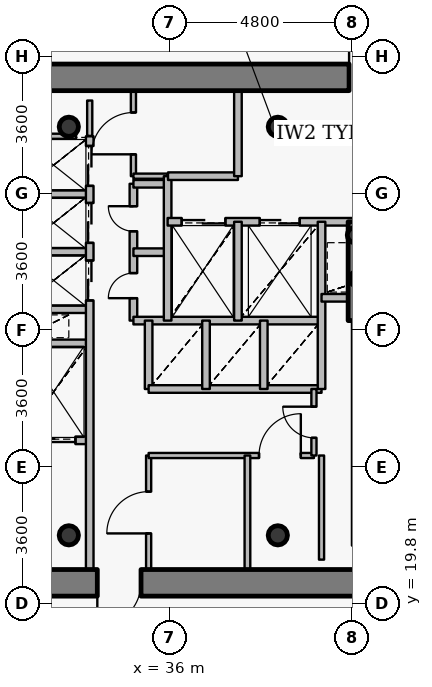
"""IFC4 building model, lengths in metres.
Left out: names, types, materials, properties, quantities, classifications, styles, units other than length and angle.
Written with IfcOpenShell. Run it as: python <this file> out.ifc"""

import sys

from ifc_helpers import new_model, si_unit, direction, frame, frame_2d, origin, origin_2d, place, context, subcontext, project, spatial, rectangle, hollow_circle, extrude, source, transform, mapped, element, fill, save


model = new_model("IFC4")
c1 = context("Model", 3, precision=1e-05, world=origin(), true_north=direction((0.0, 1.0)))
c2 = subcontext(c1, "Body", "Model", "MODEL_VIEW")
j1 = project(units=[si_unit("LENGTHUNIT", "METRE"), si_unit("PLANEANGLEUNIT", "RADIAN")], contexts=[c1])
p1 = place(None, origin())
s1 = spatial("IfcSite", under=j1, at=p1, CompositionType="ELEMENT")
p2 = place(p1, origin())
s2 = spatial("IfcBuilding", under=s1, at=p2, CompositionType="ELEMENT")
p3 = place(p2, frame((0.0, 0.0, 229.05)))
s3 = spatial("IfcBuildingStorey", under=s2, at=p3, CompositionType="ELEMENT", Elevation=229.05)
for number, where, z_axis, x_axis in (
    (1, (33.35, 21.6, 0.0), (0.0, 0.0, 1.0), (1.0, 0.0, 0.0)),
    (2, (38.85, 21.6, 0.0), (0.0, 0.0, 1.0), (1.0, 0.0, 0.0)),
    (3, (38.85, 32.35, 0.0), (0.0, 0.0, 1.0), (1.0, 0.0, 0.0)),
    (4, (33.35, 32.35, 0.0), (0.0, 0.0, 1.0), (1.0, 0.0, 0.0)),
):
    element("IfcColumn", number, at=place(p3, frame(where, z_axis=z_axis, x_axis=x_axis)), inside=s3, PredefinedType="COLUMN", context=c2, shape_type="SweptSolid", body=[
        extrude(hollow_circle(Radius=0.254, WallThickness=0.02, at=origin_2d()), origin(), (0.0, 0.0, 1.0), 3.75),
    ])
for number, where, z_axis, x_axis in (
    (5, (40.95, 28.35, 0.0), (0.0, 0.0, 1.0), (1.0, 0.0, 0.0)),
    (6, (40.88, 29.5, 0.0), (0.0, 0.0, 1.0), (1.0, 0.0, 0.0)),
):
    element("IfcColumn", number, at=place(p3, frame(where, z_axis=z_axis, x_axis=x_axis)), inside=s3, PredefinedType="COLUMN", context=c2, shape_type="SweptSolid", body=[
        extrude(hollow_circle(Radius=0.203, WallThickness=0.016, at=origin_2d()), origin(), (0.0, 0.0, 1.0), 3.75),
    ])
p4 = place(p3, frame((27.05, 33.65, 0.0), z_axis=(0.0, 0.0, 1.0), x_axis=(1.0, 0.0, 0.0)))
e7 = element("IfcWall", 7, at=p4, inside=s3, PredefinedType="SHEAR", context=c2, shape_type="SweptSolid", body=[
    extrude(rectangle(XDim=17.9, YDim=0.7, at=frame_2d((8.95, 0.0))), origin(), (0.0, 0.0, 1.0), 3.05),
])
p5 = place(p4, frame((13.675, 0.0, 0.0)))
e8 = element("IfcOpeningElement", 8, at=p5, cuts=e7, PredefinedType="OPENING", context=c2, shape_type="SweptSolid", body=[
    extrude(rectangle(XDim=1.15, YDim=2.15, at=origin_2d()), frame((0.575, 0.36, 1.075), z_axis=(0.0, -1.0, 0.0), x_axis=(1.0, 0.0, 0.0)), (0.0, 0.0, 1.0), 0.72),
])
p6 = place(p3, frame((44.95, 20.35, 0.0), z_axis=(0.0, 0.0, 1.0), x_axis=(-1.0, 0.0, 0.0)))
e9 = element("IfcWall", 9, at=p6, inside=s3, PredefinedType="SHEAR", context=c2, shape_type="SweptSolid", body=[
    extrude(rectangle(XDim=17.9, YDim=0.7, at=frame_2d((8.95, 0.0))), origin(), (0.0, 0.0, 1.0), 3.05),
])
p7 = place(p6, frame((9.7, 0.0, 0.0)))
e10 = element("IfcOpeningElement", 10, at=p7, cuts=e9, PredefinedType="OPENING", context=c2, shape_type="SweptSolid", body=[
    extrude(rectangle(XDim=1.15, YDim=2.15, at=origin_2d()), frame((0.575, 0.36, 1.075), z_axis=(0.0, -1.0, 0.0), x_axis=(1.0, 0.0, 0.0)), (0.0, 0.0, 1.0), 0.72),
])
p8 = place(p3, frame((40.9, 27.25, 0.0), z_axis=(0.0, 0.0, 1.0), x_axis=(0.0, 1.0, 0.0)))
e11 = element("IfcWall", 11, at=p8, inside=s3, PredefinedType="SHEAR", context=c2, shape_type="SweptSolid", body=[
    extrude(rectangle(XDim=2.6, YDim=0.4, at=frame_2d((1.3, 0.0))), origin(), (0.0, 0.0, 1.0), 3.1),
])
p9 = place(p3, frame((32.0, 24.1, 0.0), z_axis=(0.0, 0.0, 1.0), x_axis=(1.0, 0.0, 0.0)))
e12 = element("IfcWall", 12, at=p9, inside=s3, PredefinedType="PARTITIONING", context=c2, shape_type="SweptSolid", body=[
    extrude(rectangle(XDim=1.9, YDim=0.2, at=frame_2d((0.95, 0.0))), origin(), (0.0, 0.0, 1.0), 3.085),
])
p10 = place(p9, frame((0.375, 0.0, 0.0)))
e13 = element("IfcOpeningElement", 13, at=p10, cuts=e12, PredefinedType="OPENING", context=c2, shape_type="SweptSolid", body=[
    extrude(rectangle(XDim=1.15, YDim=2.15, at=origin_2d()), frame((0.575, 0.11, 1.075), z_axis=(0.0, -1.0, 0.0), x_axis=(1.0, 0.0, 0.0)), (0.0, 0.0, 1.0), 0.22),
])
for number, where, z_axis, x_axis in (
    (14, (32.0, 26.65, 0.0), (0.0, 0.0, 1.0), (1.0, 0.0, 0.0)),
    (15, (32.0, 27.55, 0.0), (0.0, 0.0, 1.0), (1.0, 0.0, 0.0)),
    (16, (32.0, 29.06, 0.0), (0.0, 0.0, 1.0), (1.0, 0.0, 0.0)),
    (17, (32.0, 30.58, 0.0), (0.0, 0.0, 1.0), (1.0, 0.0, 0.0)),
):
    element("IfcWall", number, at=place(p3, frame(where, z_axis=z_axis, x_axis=x_axis)), inside=s3, PredefinedType="PARTITIONING", context=c2, shape_type="SweptSolid", body=[
        extrude(rectangle(XDim=1.9, YDim=0.2, at=frame_2d((0.95, 0.0))), origin(), (0.0, 0.0, 1.0), 3.085),
    ])
p11 = place(p3, frame((33.9, 20.7, 0.0), z_axis=(0.0, 0.0, 1.0), x_axis=(0.0, 1.0, 0.0)))
e18 = element("IfcWall", 18, at=p11, inside=s3, PredefinedType="PARTITIONING", context=c2, shape_type="SweptSolid", body=[
    extrude(rectangle(XDim=11.4, YDim=0.2, at=frame_2d((5.7, 0.0))), origin(), (0.0, 0.0, 1.0), 3.085),
])
p12 = place(p11, frame((7.08, 0.0, 0.0)))
e19 = element("IfcOpeningElement", 19, at=p12, cuts=e18, PredefinedType="OPENING", context=c2, shape_type="SweptSolid", body=[
    extrude(rectangle(XDim=1.05, YDim=2.15, at=origin_2d()), frame((0.525, 0.11, 1.075), z_axis=(0.0, -1.0, 0.0), x_axis=(1.0, 0.0, 0.0)), (0.0, 0.0, 1.0), 0.22),
])
p13 = place(p11, frame((8.595, 0.0, 0.0)))
e20 = element("IfcOpeningElement", 20, at=p13, cuts=e18, PredefinedType="OPENING", context=c2, shape_type="SweptSolid", body=[
    extrude(rectangle(XDim=1.05, YDim=2.15, at=origin_2d()), frame((0.525, 0.11, 1.075), z_axis=(0.0, -1.0, 0.0), x_axis=(1.0, 0.0, 0.0)), (0.0, 0.0, 1.0), 0.22),
])
p14 = place(p11, frame((10.095, 0.0, 0.0)))
e21 = element("IfcOpeningElement", 21, at=p14, cuts=e18, PredefinedType="OPENING", context=c2, shape_type="SweptSolid", body=[
    extrude(rectangle(XDim=1.05, YDim=2.15, at=origin_2d()), frame((0.525, 0.11, 1.075), z_axis=(0.0, -1.0, 0.0), x_axis=(1.0, 0.0, 0.0)), (0.0, 0.0, 1.0), 0.22),
])
p15 = place(p3, frame((35.05, 27.25, 0.0), z_axis=(0.0, 0.0, 1.0), x_axis=(0.0, 1.0, 0.0)))
e22 = element("IfcWall", 22, at=p15, inside=s3, PredefinedType="PARTITIONING", context=c2, shape_type="SweptSolid", body=[
    extrude(rectangle(XDim=3.6, YDim=0.2, at=frame_2d((1.8, 0.0))), origin(), (0.0, 0.0, 1.0), 3.5),
])
p16 = place(p15, frame((0.59, 0.0, 0.0)))
e23 = element("IfcOpeningElement", 23, at=p16, cuts=e22, PredefinedType="OPENING", context=c2, shape_type="SweptSolid", body=[
    extrude(rectangle(XDim=0.66, YDim=2.05, at=origin_2d()), frame((0.33, 0.11, 1.025), z_axis=(0.0, -1.0, 0.0), x_axis=(1.0, 0.0, 0.0)), (0.0, 0.0, 1.0), 0.22),
])
p17 = place(p15, frame((2.35, 0.0, 0.0)))
e24 = element("IfcOpeningElement", 24, at=p17, cuts=e22, PredefinedType="OPENING", context=c2, shape_type="SweptSolid", body=[
    extrude(rectangle(XDim=0.66, YDim=2.05, at=origin_2d()), frame((0.33, 0.11, 1.025), z_axis=(0.0, -1.0, 0.0), x_axis=(1.0, 0.0, 0.0)), (0.0, 0.0, 1.0), 0.22),
])
p18 = place(p3, frame((35.05, 27.25, 0.0), z_axis=(0.0, 0.0, 1.0), x_axis=(1.0, 0.0, 0.0)))
e25 = element("IfcWall", 25, at=p18, inside=s3, PredefinedType="PARTITIONING", context=c2, shape_type="SweptSolid", body=[
    extrude(rectangle(XDim=4.95, YDim=0.2, at=frame_2d((2.475, 0.0))), origin(), (0.0, 0.0, 1.0), 3.085),
])
for number, where, z_axis, x_axis in (
    (26, (35.05, 29.05, 0.0), (0.0, 0.0, 1.0), (1.0, 0.0, 0.0)),
    (27, (35.05, 30.85, 0.0), (0.0, 0.0, 1.0), (1.0, 0.0, 0.0)),
):
    element("IfcWall", number, at=place(p3, frame(where, z_axis=z_axis, x_axis=x_axis)), inside=s3, PredefinedType="PARTITIONING", context=c2, shape_type="SweptSolid", body=[
        extrude(rectangle(XDim=0.9, YDim=0.2, at=frame_2d((0.45, 0.0))), origin(), (0.0, 0.0, 1.0), 3.5),
    ])
p19 = place(p3, frame((35.05, 31.05, 0.0), z_axis=(0.0, 0.0, 1.0), x_axis=(0.0, 1.0, 0.0)))
e28 = element("IfcWall", 28, at=p19, inside=s3, PredefinedType="PARTITIONING", context=c2, shape_type="SweptSolid", body=[
    extrude(rectangle(XDim=2.25, YDim=0.135, at=frame_2d((1.125, 0.0))), origin(), (0.0, 0.0, 1.0), 3.085),
])
p20 = place(p19, frame((0.575, 0.0, 0.0)))
e29 = element("IfcOpeningElement", 29, at=p20, cuts=e28, PredefinedType="OPENING", context=c2, shape_type="SweptSolid", body=[
    extrude(rectangle(XDim=1.1, YDim=2.15, at=origin_2d()), frame((0.55, 0.078, 1.075), z_axis=(0.0, -1.0, 0.0), x_axis=(1.0, 0.0, 0.0)), (0.0, 0.0, 1.0), 0.155),
])
p21 = place(p3, frame((35.05, 31.05, 0.0), z_axis=(0.0, 0.0, 1.0), x_axis=(1.0, 0.0, 0.0)))
e30 = element("IfcWall", 30, at=p21, inside=s3, PredefinedType="PARTITIONING", context=c2, shape_type="SweptSolid", body=[
    extrude(rectangle(XDim=0.9, YDim=0.135, at=frame_2d((0.45, 0.0))), origin(), (0.0, 0.0, 1.0), 3.5),
])
p22 = place(p3, frame((35.45, 20.7, 0.0), z_axis=(0.0, 0.0, 1.0), x_axis=(0.0, 1.0, 0.0)))
e31 = element("IfcWall", 31, at=p22, inside=s3, PredefinedType="PARTITIONING", context=c2, shape_type="SweptSolid", body=[
    extrude(rectangle(XDim=3.0, YDim=0.135, at=frame_2d((1.5, 0.0))), origin(), (0.0, 0.0, 1.0), 3.085),
])
p23 = place(p22, frame((0.95, 0.0, 0.0)))
e32 = element("IfcOpeningElement", 32, at=p23, cuts=e31, PredefinedType="OPENING", context=c2, shape_type="SweptSolid", body=[
    extrude(rectangle(XDim=1.1, YDim=2.15, at=origin_2d()), frame((0.55, 0.078, 1.075), z_axis=(0.0, -1.0, 0.0), x_axis=(1.0, 0.0, 0.0)), (0.0, 0.0, 1.0), 0.155),
])
p24 = place(p3, frame((35.45, 23.7, 0.0), z_axis=(0.0, 0.0, 1.0), x_axis=(1.0, 0.0, 0.0)))
e33 = element("IfcWall", 33, at=p24, inside=s3, PredefinedType="PARTITIONING", context=c2, shape_type="SweptSolid", body=[
    extrude(rectangle(XDim=4.35, YDim=0.135, at=frame_2d((2.175, 0.0))), origin(), (0.0, 0.0, 1.0), 3.085),
])
p25 = place(p24, frame((2.905, 0.0, 0.0)))
e34 = element("IfcOpeningElement", 34, at=p25, cuts=e33, PredefinedType="OPENING", context=c2, shape_type="SweptSolid", body=[
    extrude(rectangle(XDim=1.1, YDim=2.15, at=origin_2d()), frame((0.55, 0.078, 1.075), z_axis=(0.0, -1.0, 0.0), x_axis=(1.0, 0.0, 0.0)), (0.0, 0.0, 1.0), 0.155),
])
p26 = place(p3, frame((35.45, 25.45, 0.0), z_axis=(0.0, 0.0, 1.0), x_axis=(0.0, 1.0, 0.0)))
e35 = element("IfcWall", 35, at=p26, inside=s3, PredefinedType="PARTITIONING", context=c2, shape_type="SweptSolid", body=[
    extrude(rectangle(XDim=1.8, YDim=0.2, at=frame_2d((0.9, 0.0))), origin(), (0.0, 0.0, 1.0), 3.5),
])
p27 = place(p3, frame((35.45, 25.45, 0.0), z_axis=(0.0, 0.0, 1.0), x_axis=(1.0, 0.0, 0.0)))
e36 = element("IfcWall", 36, at=p27, inside=s3, PredefinedType="PARTITIONING", context=c2, shape_type="SweptSolid", body=[
    extrude(rectangle(XDim=4.55, YDim=0.2, at=frame_2d((2.275, 0.0))), origin(), (0.0, 0.0, 1.0), 3.085),
])
p28 = place(p3, frame((35.95, 27.25, 0.0), z_axis=(0.0, 0.0, 1.0), x_axis=(0.0, 1.0, 0.0)))
e37 = element("IfcWall", 37, at=p28, inside=s3, PredefinedType="PARTITIONING", context=c2, shape_type="SweptSolid", body=[
    extrude(rectangle(XDim=3.8, YDim=0.2, at=frame_2d((1.9, 0.0))), origin(), (0.0, 0.0, 1.0), 3.5),
])
p29 = place(p3, frame((35.95, 29.85, 0.0), z_axis=(0.0, 0.0, 1.0), x_axis=(1.0, 0.0, 0.0)))
e38 = element("IfcWall", 38, at=p29, inside=s3, PredefinedType="PARTITIONING", context=c2, shape_type="SweptSolid", body=[
    extrude(rectangle(XDim=8.49, YDim=0.2, at=frame_2d((4.245, 0.0))), origin(), (0.0, 0.0, 1.0), 3.085),
])
p30 = place(p29, frame((6.1, 0.0, 0.0)))
e39 = element("IfcOpeningElement", 39, at=p30, cuts=e38, PredefinedType="OPENING", context=c2, shape_type="SweptSolid", body=[
    extrude(rectangle(XDim=1.2, YDim=2.15, at=origin_2d()), frame((0.6, 0.11, 1.075), z_axis=(0.0, -1.0, 0.0), x_axis=(1.0, 0.0, 0.0)), (0.0, 0.0, 1.0), 0.22),
])
p31 = place(p29, frame((0.37, 0.0, 0.0)))
e40 = element("IfcOpeningElement", 40, at=p31, cuts=e38, PredefinedType="OPENING", context=c2, shape_type="SweptSolid", body=[
    extrude(rectangle(XDim=1.15, YDim=2.15, at=origin_2d()), frame((0.575, 0.11, 1.075), z_axis=(0.0, -1.0, 0.0), x_axis=(1.0, 0.0, 0.0)), (0.0, 0.0, 1.0), 0.22),
])
p32 = place(p29, frame((2.425, 0.0, 0.0)))
e41 = element("IfcOpeningElement", 41, at=p32, cuts=e38, PredefinedType="OPENING", context=c2, shape_type="SweptSolid", body=[
    extrude(rectangle(XDim=1.05, YDim=2.15, at=origin_2d()), frame((0.525, 0.11, 1.075), z_axis=(0.0, -1.0, 0.0), x_axis=(1.0, 0.0, 0.0)), (0.0, 0.0, 1.0), 0.22),
])
p33 = place(p3, frame((35.96, 31.05, 0.0), z_axis=(0.0, 0.0, 1.0), x_axis=(1.0, 0.0, 0.0)))
e42 = element("IfcWall", 42, at=p33, inside=s3, PredefinedType="PARTITIONING", context=c2, shape_type="SweptSolid", body=[
    extrude(rectangle(XDim=1.84, YDim=0.2, at=frame_2d((0.92, 0.0))), origin(), (0.0, 0.0, 1.0), 3.5),
])
p34 = place(p3, frame((36.96, 25.45, 0.0), z_axis=(0.0, 0.0, 1.0), x_axis=(0.0, 1.0, 0.0)))
e43 = element("IfcWall", 43, at=p34, inside=s3, PredefinedType="PARTITIONING", context=c2, shape_type="SweptSolid", body=[
    extrude(rectangle(XDim=1.8, YDim=0.2, at=frame_2d((0.9, 0.0))), origin(), (0.0, 0.0, 1.0), 3.5),
])
p35 = place(p3, frame((37.8, 27.25, 0.0), z_axis=(0.0, 0.0, 1.0), x_axis=(0.0, 1.0, 0.0)))
e44 = element("IfcWall", 44, at=p35, inside=s3, PredefinedType="PARTITIONING", context=c2, shape_type="SweptSolid", body=[
    extrude(rectangle(XDim=2.6, YDim=0.2, at=frame_2d((1.3, 0.0))), origin(), (0.0, 0.0, 1.0), 3.5),
])
p36 = place(p3, frame((37.8, 31.05, 0.0), z_axis=(0.0, 0.0, 1.0), x_axis=(0.0, 1.0, 0.0)))
e45 = element("IfcWall", 45, at=p36, inside=s3, PredefinedType="PARTITIONING", context=c2, shape_type="SweptSolid", body=[
    extrude(rectangle(XDim=2.25, YDim=0.2, at=frame_2d((1.125, 0.0))), origin(), (0.0, 0.0, 1.0), 3.085),
])
p37 = place(p3, frame((38.05, 20.18, 0.0), z_axis=(0.0, 0.0, 1.0), x_axis=(0.0, 1.0, 0.0)))
e46 = element("IfcWall", 46, at=p37, inside=s3, PredefinedType="PARTITIONING", context=c2, shape_type="SweptSolid", body=[
    extrude(rectangle(XDim=3.52, YDim=0.15, at=frame_2d((1.76, 0.0))), origin(), (0.0, 0.0, 1.0), 3.035),
])
p38 = place(p3, frame((38.48, 25.45, 0.0), z_axis=(0.0, 0.0, 1.0), x_axis=(0.0, 1.0, 0.0)))
e47 = element("IfcWall", 47, at=p38, inside=s3, PredefinedType="PARTITIONING", context=c2, shape_type="SweptSolid", body=[
    extrude(rectangle(XDim=1.8, YDim=0.2, at=frame_2d((0.9, 0.0))), origin(), (0.0, 0.0, 1.0), 3.5),
])
p39 = place(p3, frame((39.8, 23.7, 0.0), z_axis=(0.0, 0.0, 1.0), x_axis=(0.0, 1.0, 0.0)))
e48 = element("IfcWall", 48, at=p39, inside=s3, PredefinedType="PARTITIONING", context=c2, shape_type="SweptSolid", body=[
    extrude(rectangle(XDim=1.75, YDim=0.135, at=frame_2d((0.875, 0.0))), origin(), (0.0, 0.0, 1.0), 3.5),
])
p40 = place(p39, frame((0.465, 0.0, 0.0)))
e49 = element("IfcOpeningElement", 49, at=p40, cuts=e48, PredefinedType="OPENING", context=c2, shape_type="SweptSolid", body=[
    extrude(rectangle(XDim=0.82, YDim=2.1, at=origin_2d()), frame((0.41, 0.078, 1.05), z_axis=(0.0, -1.0, 0.0), x_axis=(1.0, 0.0, 0.0)), (0.0, 0.0, 1.0), 0.155),
])
p41 = place(p3, frame((40.0, 25.45, 0.0), z_axis=(0.0, 0.0, 1.0), x_axis=(0.0, 1.0, 0.0)))
e50 = element("IfcWall", 50, at=p41, inside=s3, PredefinedType="PARTITIONING", context=c2, shape_type="SweptSolid", body=[
    extrude(rectangle(XDim=4.4, YDim=0.2, at=frame_2d((2.2, 0.0))), origin(), (0.0, 0.0, 1.0), 3.5),
])
p42 = place(p3, frame((40.0, 27.85, 0.0), z_axis=(0.0, 0.0, 1.0), x_axis=(1.0, 0.0, 0.0)))
e51 = element("IfcWall", 51, at=p42, inside=s3, PredefinedType="PARTITIONING", context=c2, shape_type="SweptSolid", body=[
    extrude(rectangle(XDim=0.9, YDim=0.2, at=frame_2d((0.45, 0.0))), origin(), (0.0, 0.0, 1.0), 3.5),
])
p43 = place(p3, frame((40.9, 21.33, 0.0), z_axis=(0.0, 0.0, 1.0), x_axis=(0.0, 1.0, 0.0)))
e52 = element("IfcWall", 52, at=p43, inside=s3, PredefinedType="PARTITIONING", context=c2, shape_type="SweptSolid", body=[
    extrude(rectangle(XDim=5.91, YDim=0.2, at=frame_2d((2.955, 0.0))), origin(), (0.0, 0.0, 1.0), 3.035),
])
p44 = place(p3, frame((32.36, 32.1, 0.0), z_axis=(0.0, 0.0, 1.0), x_axis=(1.0, 0.0, 0.0)))
e53 = element("IfcWall", 53, at=p44, inside=s3, PredefinedType="PARTITIONING", context=c2, shape_type="SweptSolid", body=[
    extrude(rectangle(XDim=1.18, YDim=0.135, at=frame_2d((0.59, 0.0))), origin(), (0.0, 0.0, 1.0), 3.085),
])
p45 = place(p3, frame((40.0, 23.7, 0.0), z_axis=(0.0, 0.0, 1.0), x_axis=(0.0, -1.0, 0.0)))
e54 = element("IfcWall", 54, at=p45, inside=s3, PredefinedType="PARTITIONING", context=c2, shape_type="SweptSolid", body=[
    extrude(rectangle(XDim=2.74, YDim=0.135, at=frame_2d((1.37, 0.0))), origin(), (0.0, 0.0, 1.0), 3.035),
])
p46 = place(p3, frame((33.9, 32.11, 0.0), z_axis=(0.0, 0.0, 1.0), x_axis=(0.0, 1.0, 0.0)))
e55 = element("IfcWall", 55, at=p46, inside=s3, PredefinedType="PARTITIONING", context=c2, shape_type="SweptSolid", body=[
    extrude(rectangle(XDim=0.93, YDim=0.135, at=frame_2d((0.465, 0.0))), origin(), (0.0, 0.0, 1.0), 3.085),
])
m1 = source(origin(), c2, "Body", "SweptSolid", [
    extrude(rectangle(XDim=1.15, YDim=2.15, at=origin_2d()), frame((0.575, 0.025, 1.075), z_axis=(0.0, -1.0, 0.0), x_axis=(1.0, 0.0, 0.0)), (0.0, 0.0, 1.0), 0.05),
])
p47 = place(p5, origin())
e56 = element("IfcDoor", 56, at=p47, inside=s3, OperationType="SINGLE_SWING_LEFT", PredefinedType="DOOR", context=c2, shape_type="MappedRepresentation", body=[
    mapped(m1, transform((0.0, 0.0, 0.0), x_axis=(1.0, 0.0, 0.0), y_axis=(0.0, 1.0, 0.0), z_axis=(0.0, 0.0, 1.0), scale=1.0)),
])
fill(e8, e56)
p48 = place(p7, origin())
e57 = element("IfcDoor", 57, at=p48, inside=s3, OperationType="SINGLE_SWING_RIGHT", PredefinedType="DOOR", context=c2, shape_type="MappedRepresentation", body=[
    mapped(m1, transform((0.0, 0.0, 0.0), x_axis=(1.0, 0.0, 0.0), y_axis=(0.0, 1.0, 0.0), z_axis=(0.0, 0.0, 1.0), scale=1.0)),
])
fill(e10, e57)
m2 = source(origin(), c2, "Body", "SweptSolid", [
    extrude(rectangle(XDim=1.15, YDim=2.15, at=origin_2d()), frame((0.575, 0.025, 1.075), z_axis=(0.0, -1.0, 0.0), x_axis=(1.0, 0.0, 0.0)), (0.0, 0.0, 1.0), 0.05),
])
p49 = place(p31, origin())
e58 = element("IfcDoor", 58, at=p49, inside=s3, OperationType="DOUBLE_DOOR_SLIDING", PredefinedType="USERDEFINED", context=c2, shape_type="MappedRepresentation", body=[
    mapped(m2, transform((0.0, 0.0, 0.0), x_axis=(1.0, 0.0, 0.0), y_axis=(0.0, 1.0, 0.0), z_axis=(0.0, 0.0, 1.0), scale=1.0)),
])
fill(e40, e58)
p50 = place(p10, origin())
e59 = element("IfcDoor", 59, at=p50, inside=s3, OperationType="DOUBLE_DOOR_SLIDING", PredefinedType="USERDEFINED", context=c2, shape_type="MappedRepresentation", body=[
    mapped(m2, transform((0.0, 0.0, 0.0), x_axis=(1.0, 0.0, 0.0), y_axis=(0.0, 1.0, 0.0), z_axis=(0.0, 0.0, 1.0), scale=1.0)),
])
fill(e13, e59)
m3 = source(origin(), c2, "Body", "SweptSolid", [
    extrude(rectangle(XDim=1.05, YDim=2.15, at=origin_2d()), frame((0.525, 0.025, 1.075), z_axis=(0.0, -1.0, 0.0), x_axis=(1.0, 0.0, 0.0)), (0.0, 0.0, 1.0), 0.05),
])
p51 = place(p32, origin())
e60 = element("IfcDoor", 60, at=p51, inside=s3, OperationType="DOUBLE_DOOR_SLIDING", PredefinedType="USERDEFINED", context=c2, shape_type="MappedRepresentation", body=[
    mapped(m3, transform((0.0, 0.0, 0.0), x_axis=(1.0, 0.0, 0.0), y_axis=(0.0, 1.0, 0.0), z_axis=(0.0, 0.0, 1.0), scale=1.0)),
])
fill(e41, e60)
p52 = place(p12, origin())
e61 = element("IfcDoor", 61, at=p52, inside=s3, OperationType="DOUBLE_DOOR_SLIDING", PredefinedType="USERDEFINED", context=c2, shape_type="MappedRepresentation", body=[
    mapped(m3, transform((0.0, 0.0, 0.0), x_axis=(1.0, 0.0, 0.0), y_axis=(0.0, 1.0, 0.0), z_axis=(0.0, 0.0, 1.0), scale=1.0)),
])
fill(e19, e61)
p53 = place(p13, origin())
e62 = element("IfcDoor", 62, at=p53, inside=s3, OperationType="DOUBLE_DOOR_SLIDING", PredefinedType="USERDEFINED", context=c2, shape_type="MappedRepresentation", body=[
    mapped(m3, transform((0.0, 0.0, 0.0), x_axis=(1.0, 0.0, 0.0), y_axis=(0.0, 1.0, 0.0), z_axis=(0.0, 0.0, 1.0), scale=1.0)),
])
fill(e20, e62)
p54 = place(p14, origin())
e63 = element("IfcDoor", 63, at=p54, inside=s3, OperationType="DOUBLE_DOOR_SLIDING", PredefinedType="USERDEFINED", context=c2, shape_type="MappedRepresentation", body=[
    mapped(m3, transform((0.0, 0.0, 0.0), x_axis=(1.0, 0.0, 0.0), y_axis=(0.0, 1.0, 0.0), z_axis=(0.0, 0.0, 1.0), scale=1.0)),
])
fill(e21, e63)
m4 = source(origin(), c2, "Body", "SweptSolid", [
    extrude(rectangle(XDim=0.66, YDim=2.05, at=origin_2d()), frame((0.33, 0.025, 1.025), z_axis=(0.0, -1.0, 0.0), x_axis=(1.0, 0.0, 0.0)), (0.0, 0.0, 1.0), 0.05),
])
p55 = place(p16, origin())
e64 = element("IfcDoor", 64, at=p55, inside=s3, OperationType="SINGLE_SWING_LEFT", PredefinedType="USERDEFINED", context=c2, shape_type="MappedRepresentation", body=[
    mapped(m4, transform((0.0, 0.0, 0.0), x_axis=(1.0, 0.0, 0.0), y_axis=(0.0, 1.0, 0.0), z_axis=(0.0, 0.0, 1.0), scale=1.0)),
])
fill(e23, e64)
p56 = place(p17, origin())
e65 = element("IfcDoor", 65, at=p56, inside=s3, OperationType="SINGLE_SWING_RIGHT", PredefinedType="USERDEFINED", context=c2, shape_type="MappedRepresentation", body=[
    mapped(m4, transform((0.0, 0.0, 0.0), x_axis=(1.0, 0.0, 0.0), y_axis=(0.0, 1.0, 0.0), z_axis=(0.0, 0.0, 1.0), scale=1.0)),
])
fill(e24, e65)
m5 = source(origin(), c2, "Body", "SweptSolid", [
    extrude(rectangle(XDim=1.1, YDim=2.15, at=origin_2d()), frame((0.55, 0.025, 1.075), z_axis=(0.0, -1.0, 0.0), x_axis=(1.0, 0.0, 0.0)), (0.0, 0.0, 1.0), 0.05),
])
p57 = place(p23, origin())
e66 = element("IfcDoor", 66, at=p57, inside=s3, OperationType="SINGLE_SWING_LEFT", PredefinedType="DOOR", context=c2, shape_type="MappedRepresentation", body=[
    mapped(m5, transform((0.0, 0.0, 0.0), x_axis=(1.0, 0.0, 0.0), y_axis=(0.0, 1.0, 0.0), z_axis=(0.0, 0.0, 1.0), scale=1.0)),
])
fill(e32, e66)
p58 = place(p25, origin())
e67 = element("IfcDoor", 67, at=p58, inside=s3, OperationType="SINGLE_SWING_RIGHT", PredefinedType="DOOR", context=c2, shape_type="MappedRepresentation", body=[
    mapped(m5, transform((0.0, 0.0, 0.0), x_axis=(1.0, 0.0, 0.0), y_axis=(0.0, 1.0, 0.0), z_axis=(0.0, 0.0, 1.0), scale=1.0)),
])
fill(e34, e67)
p59 = place(p20, origin())
e68 = element("IfcDoor", 68, at=p59, inside=s3, OperationType="SINGLE_SWING_LEFT", PredefinedType="DOOR", context=c2, shape_type="MappedRepresentation", body=[
    mapped(m5, transform((0.0, 0.0, 0.0), x_axis=(1.0, 0.0, 0.0), y_axis=(0.0, 1.0, 0.0), z_axis=(0.0, 0.0, 1.0), scale=1.0)),
])
fill(e29, e68)
m6 = source(origin(), c2, "Body", "SweptSolid", [
    extrude(rectangle(XDim=0.82, YDim=2.1, at=origin_2d()), frame((0.41, 0.025, 1.05), z_axis=(0.0, -1.0, 0.0), x_axis=(1.0, 0.0, 0.0)), (0.0, 0.0, 1.0), 0.05),
])
p60 = place(p40, origin())
e69 = element("IfcDoor", 69, at=p60, inside=s3, OperationType="SINGLE_SWING_RIGHT", PredefinedType="DOOR", context=c2, shape_type="MappedRepresentation", body=[
    mapped(m6, transform((0.0, 0.0, 0.0), x_axis=(1.0, 0.0, 0.0), y_axis=(0.0, 1.0, 0.0), z_axis=(0.0, 0.0, 1.0), scale=1.0)),
])
fill(e49, e69)
save(model, sys.argv[1])
